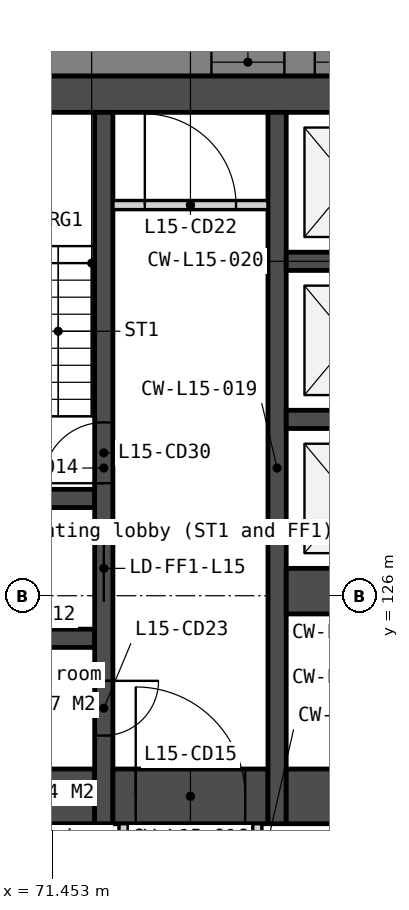
"""IFC4 building model, lengths in metres.
Left out: names, types, materials, properties, quantities, classifications, styles, units other than length and angle.
Written with IfcOpenShell. Run it as: python <this file> out.ifc"""

import sys

from ifc_helpers import new_model, si_unit, direction, frame, frame_2d, origin, place, context, subcontext, project, spatial, polyline, rectangle, outline, extrude, element, fill, save


model = new_model("IFC4")
c1 = context("Model", 3, precision=1e-05, world=origin(), true_north=direction((0.0, 1.0)))
c2 = subcontext(c1, "Body", "Model", "MODEL_VIEW")
j1 = project(units=[si_unit("LENGTHUNIT", "METRE"), si_unit("PLANEANGLEUNIT", "RADIAN")], contexts=[c1])
p1 = place(None, origin())
s1 = spatial("IfcSite", under=j1, at=p1, CompositionType="ELEMENT")
p2 = place(p1, origin())
s2 = spatial("IfcBuilding", under=s1, at=p2, CompositionType="ELEMENT")
p3 = place(p2, frame((0.0, 0.0, 66.5)))
s3 = spatial("IfcBuildingStorey", under=s2, at=p3, CompositionType="ELEMENT", Elevation=66.5)
p4 = place(p3, frame((66.0, 134.25, 0.0), z_axis=(0.0, 0.0, 1.0), x_axis=(1.0, 0.0, 0.0)))
e1 = element("IfcWall", 1, at=p4, inside=s3, PredefinedType="SOLIDWALL", context=c2, shape_type="SweptSolid", body=[
    extrude(rectangle(XDim=28.0, YDim=0.6, at=frame_2d((14.0, 0.0))), origin(), (0.0, 0.0, 1.0), 3.35),
])
for number, where, z_axis, x_axis in (
    (2, (69.6, 127.6, 0.0), (0.0, 0.0, 1.0), (1.0, 0.0, 0.0)),
    (3, (69.6, 125.3, 0.0), (0.0, 0.0, 1.0), (1.0, 0.0, 0.0)),
):
    element("IfcWall", number, at=place(p3, frame(where, z_axis=z_axis, x_axis=x_axis)), inside=s3, PredefinedType="SOLIDWALL", context=c2, shape_type="SweptSolid", body=[
        extrude(rectangle(XDim=2.55, YDim=0.3, at=frame_2d((1.275, 0.0))), origin(), (0.0, 0.0, 1.0), 3.35),
    ])
p5 = place(p3, frame((69.6, 122.7, 0.0), z_axis=(0.0, 0.0, 1.0), x_axis=(1.0, 0.0, 0.0)))
e4 = element("IfcWall", 4, at=p5, inside=s3, PredefinedType="SOLIDWALL", context=c2, shape_type="SweptSolid", body=[
    extrude(rectangle(XDim=2.55, YDim=0.9, at=frame_2d((1.275, 0.0))), origin(), (0.0, 0.0, 1.0), 3.35),
])
p6 = place(p3, frame((72.3, 133.95, 0.0), z_axis=(0.0, 0.0, 1.0), x_axis=(0.0, -1.0, 0.0)))
e5 = element("IfcWall", 5, at=p6, inside=s3, PredefinedType="SOLIDWALL", context=c2, shape_type="SweptSolid", body=[
    extrude(rectangle(XDim=11.7, YDim=0.3, at=frame_2d((5.85, 0.0))), origin(), (0.0, 0.0, 1.0), 3.35),
])
p7 = place(p6, frame((6.95, 0.0, 0.0)))
e6 = element("IfcOpeningElement", 6, at=p7, cuts=e5, PredefinedType="OPENING", context=c2, shape_type="SweptSolid", body=[
    extrude(rectangle(XDim=1.1, YDim=2.1, at=frame_2d((0.55, 1.05))), frame((0.0, 0.16, 0.0), z_axis=(0.0, -1.0, 0.0), x_axis=(1.0, 0.0, 0.0)), (0.0, 0.0, 1.0), 0.32),
])
p8 = place(p6, frame((9.35, 0.0, 0.0)))
e7 = element("IfcOpeningElement", 7, at=p8, cuts=e5, PredefinedType="OPENING", context=c2, shape_type="SweptSolid", body=[
    extrude(rectangle(XDim=0.9, YDim=2.1, at=frame_2d((0.45, 1.05))), frame((0.0, 0.16, 0.0), z_axis=(0.0, -1.0, 0.0), x_axis=(1.0, 0.0, 0.0)), (0.0, 0.0, 1.0), 0.32),
])
p9 = place(p6, frame((5.1, 0.0, 0.0)))
e8 = element("IfcOpeningElement", 8, at=p9, cuts=e5, PredefinedType="OPENING", context=c2, shape_type="SweptSolid", body=[
    extrude(rectangle(XDim=1.0, YDim=2.1, at=frame_2d((0.5, 1.05))), frame((0.0, 0.16, 0.0), z_axis=(0.0, -1.0, 0.0), x_axis=(1.0, 0.0, 0.0)), (0.0, 0.0, 1.0), 0.32),
])
p10 = place(p3, frame((72.45, 132.425, 0.0), z_axis=(0.0, 0.0, 1.0), x_axis=(1.0, 0.0, 0.0)))
e9 = element("IfcWall", 9, at=p10, inside=s3, PredefinedType="PARTITIONING", context=c2, shape_type="SweptSolid", body=[
    extrude(rectangle(XDim=2.55, YDim=0.15, at=frame_2d((1.275, 0.0))), origin(), (0.0, 0.0, 1.0), 3.35),
])
p11 = place(p10, frame((0.525, 0.0, 0.0)))
e10 = element("IfcOpeningElement", 10, at=p11, cuts=e9, PredefinedType="OPENING", context=c2, shape_type="SweptSolid", body=[
    extrude(rectangle(XDim=1.5, YDim=2.1, at=frame_2d((0.75, 1.05))), frame((0.0, 0.085, 0.0), z_axis=(0.0, -1.0, 0.0), x_axis=(1.0, 0.0, 0.0)), (0.0, 0.0, 1.0), 0.17),
])
p12 = place(p3, frame((72.45, 122.7, 0.0), z_axis=(0.0, 0.0, 1.0), x_axis=(1.0, 0.0, 0.0)))
e11 = element("IfcWall", 11, at=p12, inside=s3, PredefinedType="SOLIDWALL", context=c2, shape_type="SweptSolid", body=[
    extrude(rectangle(XDim=2.55, YDim=0.9, at=frame_2d((1.275, 0.0))), origin(), (0.0, 0.0, 1.0), 3.35),
])
p13 = place(p12, frame((0.375, 0.0, 0.0)))
e12 = element("IfcOpeningElement", 12, at=p13, cuts=e11, PredefinedType="OPENING", context=c2, shape_type="SweptSolid", body=[
    extrude(rectangle(XDim=1.8, YDim=2.1, at=frame_2d((0.9, 1.05))), frame((0.0, 0.46, 0.0), z_axis=(0.0, -1.0, 0.0), x_axis=(1.0, 0.0, 0.0)), (0.0, 0.0, 1.0), 0.92),
])
for number, where, z_axis, x_axis in (
    (13, (72.625, 122.25, 0.0), (0.0, 0.0, 1.0), (0.0, -1.0, 0.0)),
    (14, (74.825, 122.25, 0.0), (0.0, 0.0, 1.0), (0.0, -1.0, 0.0)),
):
    element("IfcWall", number, at=place(p3, frame(where, z_axis=z_axis, x_axis=x_axis)), inside=s3, PredefinedType="PARTITIONING", context=c2, shape_type="SweptSolid", body=[
        extrude(rectangle(XDim=2.1, YDim=0.15, at=frame_2d((1.05, 0.0))), origin(), (0.0, 0.0, 1.0), 3.35),
    ])
p14 = place(p3, frame((75.15, 133.95, 0.0), z_axis=(0.0, 0.0, 1.0), x_axis=(0.0, -1.0, 0.0)))
e15 = element("IfcWall", 15, at=p14, inside=s3, PredefinedType="SOLIDWALL", context=c2, shape_type="SweptSolid", body=[
    extrude(rectangle(XDim=11.7, YDim=0.3, at=frame_2d((5.85, 0.0))), origin(), (0.0, 0.0, 1.0), 3.35),
])
for number, where, z_axis, x_axis in (
    (16, (75.3, 131.5, 0.0), (0.0, 0.0, 1.0), (1.0, 0.0, 0.0)),
    (17, (75.3, 128.9, 0.0), (0.0, 0.0, 1.0), (1.0, 0.0, 0.0)),
):
    element("IfcWall", number, at=place(p3, frame(where, z_axis=z_axis, x_axis=x_axis)), inside=s3, PredefinedType="SOLIDWALL", context=c2, shape_type="SweptSolid", body=[
        extrude(rectangle(XDim=2.1, YDim=0.3, at=frame_2d((1.05, 0.0))), origin(), (0.0, 0.0, 1.0), 3.35),
    ])
p15 = place(p3, frame((75.3, 126.075, 0.0), z_axis=(0.0, 0.0, 1.0), x_axis=(1.0, 0.0, 0.0)))
e18 = element("IfcWall", 18, at=p15, inside=s3, PredefinedType="SOLIDWALL", context=c2, shape_type="SweptSolid", body=[
    extrude(rectangle(XDim=2.1, YDim=0.75, at=frame_2d((1.05, 0.0))), origin(), (0.0, 0.0, 1.0), 3.35),
])
p16 = place(p3, frame((75.3, 122.7, 0.0), z_axis=(0.0, 0.0, 1.0), x_axis=(1.0, 0.0, 0.0)))
e19 = element("IfcWall", 19, at=p16, inside=s3, PredefinedType="SOLIDWALL", context=c2, shape_type="SweptSolid", body=[
    extrude(rectangle(XDim=6.2, YDim=0.9, at=frame_2d((3.1, 0.0))), origin(), (0.0, 0.0, 1.0), 3.35),
])
p17 = place(p3, frame((102.4, 134.775, -0.15), z_axis=(0.0, 0.0, 1.0), x_axis=(-1.0, 0.0, 0.0)))
e20 = element("IfcWall", 20, at=p17, inside=s3, PredefinedType="SOLIDWALL", context=c2, shape_type="SweptSolid", body=[
    extrude(outline(polyline([(44.8, 0.0), (44.8, 3.5), (0.0, 3.5), (0.0, 0.0), (44.8, 0.0)])), frame((0.0, 0.225, 0.0), z_axis=(0.0, -1.0, 0.0), x_axis=(1.0, 0.0, 0.0)), (0.0, 0.0, 1.0), 0.45),
])
p18 = place(p17, frame((0.722, 0.0, 1.05)))
e21 = element("IfcOpeningElement", 21, at=p18, cuts=e20, PredefinedType="OPENING", context=c2, shape_type="SweptSolid", body=[
    extrude(rectangle(XDim=1.2, YDim=1.5, at=frame_2d((0.6, 0.75))), frame((0.0, 0.235, 0.0), z_axis=(0.0, -1.0, 0.0), x_axis=(1.0, 0.0, 0.0)), (0.0, 0.0, 1.0), 0.47),
])
p19 = place(p17, frame((7.51, 0.0, 1.05)))
e22 = element("IfcOpeningElement", 22, at=p19, cuts=e20, PredefinedType="OPENING", context=c2, shape_type="SweptSolid", body=[
    extrude(rectangle(XDim=1.2, YDim=1.5, at=frame_2d((0.6, 0.75))), frame((0.0, 0.235, 0.0), z_axis=(0.0, -1.0, 0.0), x_axis=(1.0, 0.0, 0.0)), (0.0, 0.0, 1.0), 0.47),
])
p20 = place(p17, frame((9.21, 0.0, 1.05)))
e23 = element("IfcOpeningElement", 23, at=p20, cuts=e20, PredefinedType="OPENING", context=c2, shape_type="SweptSolid", body=[
    extrude(rectangle(XDim=1.2, YDim=1.5, at=frame_2d((0.6, 0.75))), frame((0.0, 0.235, 0.0), z_axis=(0.0, -1.0, 0.0), x_axis=(1.0, 0.0, 0.0)), (0.0, 0.0, 1.0), 0.47),
])
p21 = place(p17, frame((16.47, 0.0, 1.05)))
e24 = element("IfcOpeningElement", 24, at=p21, cuts=e20, PredefinedType="OPENING", context=c2, shape_type="SweptSolid", body=[
    extrude(rectangle(XDim=1.2, YDim=1.5, at=frame_2d((0.6, 0.75))), frame((0.0, 0.235, 0.0), z_axis=(0.0, -1.0, 0.0), x_axis=(1.0, 0.0, 0.0)), (0.0, 0.0, 1.0), 0.47),
])
p22 = place(p17, frame((18.17, 0.0, 1.05)))
e25 = element("IfcOpeningElement", 25, at=p22, cuts=e20, PredefinedType="OPENING", context=c2, shape_type="SweptSolid", body=[
    extrude(rectangle(XDim=1.2, YDim=1.5, at=frame_2d((0.6, 0.75))), frame((0.0, 0.235, 0.0), z_axis=(0.0, -1.0, 0.0), x_axis=(1.0, 0.0, 0.0)), (0.0, 0.0, 1.0), 0.47),
])
p23 = place(p17, frame((25.43, 0.0, 1.05)))
e26 = element("IfcOpeningElement", 26, at=p23, cuts=e20, PredefinedType="OPENING", context=c2, shape_type="SweptSolid", body=[
    extrude(rectangle(XDim=1.2, YDim=1.5, at=frame_2d((0.6, 0.75))), frame((0.0, 0.235, 0.0), z_axis=(0.0, -1.0, 0.0), x_axis=(1.0, 0.0, 0.0)), (0.0, 0.0, 1.0), 0.47),
])
p24 = place(p17, frame((27.13, 0.0, 1.05)))
e27 = element("IfcOpeningElement", 27, at=p24, cuts=e20, PredefinedType="OPENING", context=c2, shape_type="SweptSolid", body=[
    extrude(rectangle(XDim=1.2, YDim=1.5, at=frame_2d((0.6, 0.75))), frame((0.0, 0.235, 0.0), z_axis=(0.0, -1.0, 0.0), x_axis=(1.0, 0.0, 0.0)), (0.0, 0.0, 1.0), 0.47),
])
p25 = place(p17, frame((34.39, 0.0, 1.05)))
e28 = element("IfcOpeningElement", 28, at=p25, cuts=e20, PredefinedType="OPENING", context=c2, shape_type="SweptSolid", body=[
    extrude(rectangle(XDim=1.2, YDim=1.5, at=frame_2d((0.6, 0.75))), frame((0.0, 0.235, 0.0), z_axis=(0.0, -1.0, 0.0), x_axis=(1.0, 0.0, 0.0)), (0.0, 0.0, 1.0), 0.47),
])
p26 = place(p17, frame((36.09, 0.0, 1.05)))
e29 = element("IfcOpeningElement", 29, at=p26, cuts=e20, PredefinedType="OPENING", context=c2, shape_type="SweptSolid", body=[
    extrude(rectangle(XDim=1.2, YDim=1.5, at=frame_2d((0.6, 0.75))), frame((0.0, 0.235, 0.0), z_axis=(0.0, -1.0, 0.0), x_axis=(1.0, 0.0, 0.0)), (0.0, 0.0, 1.0), 0.47),
])
p27 = place(p17, frame((42.878, 0.0, 1.05)))
e30 = element("IfcOpeningElement", 30, at=p27, cuts=e20, PredefinedType="OPENING", context=c2, shape_type="SweptSolid", body=[
    extrude(rectangle(XDim=1.2, YDim=1.5, at=frame_2d((0.6, 0.75))), frame((0.0, 0.235, 0.0), z_axis=(0.0, -1.0, 0.0), x_axis=(1.0, 0.0, 0.0)), (0.0, 0.0, 1.0), 0.47),
])
p28 = place(p3, frame((54.495, 129.397, -0.15), z_axis=(0.0, 0.0, 1.0), x_axis=(0.499999201451, -0.866025864826, 0.0)))
e31 = element("IfcWall", 31, at=p28, inside=s3, PredefinedType="SOLIDWALL", context=c2, shape_type="SweptSolid", body=[
    extrude(outline(polyline([(44.8, 0.0), (44.8, 3.5), (0.0, 3.5), (0.0, 0.0), (44.8, 0.0)])), frame((0.0, 0.225, 0.0), z_axis=(0.0, -1.0, 0.0), x_axis=(1.0, 0.0, 0.0)), (0.0, 0.0, 1.0), 0.45),
])
p29 = place(p28, frame((0.722, 0.0, 1.05)))
e32 = element("IfcOpeningElement", 32, at=p29, cuts=e31, PredefinedType="OPENING", context=c2, shape_type="SweptSolid", body=[
    extrude(rectangle(XDim=1.2, YDim=1.5, at=frame_2d((0.6, 0.75))), frame((0.0, 0.235, 0.0), z_axis=(0.0, -1.0, 0.0), x_axis=(1.0, 0.0, 0.0)), (0.0, 0.0, 1.0), 0.47),
])
p30 = place(p28, frame((7.51, 0.0, 1.05)))
e33 = element("IfcOpeningElement", 33, at=p30, cuts=e31, PredefinedType="OPENING", context=c2, shape_type="SweptSolid", body=[
    extrude(rectangle(XDim=1.2, YDim=1.5, at=frame_2d((0.6, 0.75))), frame((0.0, 0.235, 0.0), z_axis=(0.0, -1.0, 0.0), x_axis=(1.0, 0.0, 0.0)), (0.0, 0.0, 1.0), 0.47),
])
p31 = place(p28, frame((9.21, 0.0, 1.05)))
e34 = element("IfcOpeningElement", 34, at=p31, cuts=e31, PredefinedType="OPENING", context=c2, shape_type="SweptSolid", body=[
    extrude(rectangle(XDim=1.2, YDim=1.5, at=frame_2d((0.6, 0.75))), frame((0.0, 0.235, 0.0), z_axis=(0.0, -1.0, 0.0), x_axis=(1.0, 0.0, 0.0)), (0.0, 0.0, 1.0), 0.47),
])
p32 = place(p28, frame((16.47, 0.0, 1.05)))
e35 = element("IfcOpeningElement", 35, at=p32, cuts=e31, PredefinedType="OPENING", context=c2, shape_type="SweptSolid", body=[
    extrude(rectangle(XDim=1.2, YDim=1.5, at=frame_2d((0.6, 0.75))), frame((0.0, 0.235, 0.0), z_axis=(0.0, -1.0, 0.0), x_axis=(1.0, 0.0, 0.0)), (0.0, 0.0, 1.0), 0.47),
])
p33 = place(p28, frame((18.17, 0.0, 1.05)))
e36 = element("IfcOpeningElement", 36, at=p33, cuts=e31, PredefinedType="OPENING", context=c2, shape_type="SweptSolid", body=[
    extrude(rectangle(XDim=1.2, YDim=1.5, at=frame_2d((0.6, 0.75))), frame((0.0, 0.235, 0.0), z_axis=(0.0, -1.0, 0.0), x_axis=(1.0, 0.0, 0.0)), (0.0, 0.0, 1.0), 0.47),
])
p34 = place(p28, frame((25.43, 0.0, 1.05)))
e37 = element("IfcOpeningElement", 37, at=p34, cuts=e31, PredefinedType="OPENING", context=c2, shape_type="SweptSolid", body=[
    extrude(rectangle(XDim=1.2, YDim=1.5, at=frame_2d((0.6, 0.75))), frame((0.0, 0.235, 0.0), z_axis=(0.0, -1.0, 0.0), x_axis=(1.0, 0.0, 0.0)), (0.0, 0.0, 1.0), 0.47),
])
p35 = place(p28, frame((27.13, 0.0, 1.05)))
e38 = element("IfcOpeningElement", 38, at=p35, cuts=e31, PredefinedType="OPENING", context=c2, shape_type="SweptSolid", body=[
    extrude(rectangle(XDim=1.2, YDim=1.5, at=frame_2d((0.6, 0.75))), frame((0.0, 0.235, 0.0), z_axis=(0.0, -1.0, 0.0), x_axis=(1.0, 0.0, 0.0)), (0.0, 0.0, 1.0), 0.47),
])
p36 = place(p28, frame((34.39, 0.0, 1.05)))
e39 = element("IfcOpeningElement", 39, at=p36, cuts=e31, PredefinedType="OPENING", context=c2, shape_type="SweptSolid", body=[
    extrude(rectangle(XDim=1.2, YDim=1.5, at=frame_2d((0.6, 0.75))), frame((0.0, 0.235, 0.0), z_axis=(0.0, -1.0, 0.0), x_axis=(1.0, 0.0, 0.0)), (0.0, 0.0, 1.0), 0.47),
])
p37 = place(p28, frame((36.09, 0.0, 1.05)))
e40 = element("IfcOpeningElement", 40, at=p37, cuts=e31, PredefinedType="OPENING", context=c2, shape_type="SweptSolid", body=[
    extrude(rectangle(XDim=1.2, YDim=1.5, at=frame_2d((0.6, 0.75))), frame((0.0, 0.235, 0.0), z_axis=(0.0, -1.0, 0.0), x_axis=(1.0, 0.0, 0.0)), (0.0, 0.0, 1.0), 0.47),
])
p38 = place(p28, frame((42.878, 0.0, 1.05)))
e41 = element("IfcOpeningElement", 41, at=p38, cuts=e31, PredefinedType="OPENING", context=c2, shape_type="SweptSolid", body=[
    extrude(rectangle(XDim=1.2, YDim=1.5, at=frame_2d((0.6, 0.75))), frame((0.0, 0.235, 0.0), z_axis=(0.0, -1.0, 0.0), x_axis=(1.0, 0.0, 0.0)), (0.0, 0.0, 1.0), 0.47),
])
p39 = place(p7, origin())
e42 = element("IfcDoor", 42, at=p39, inside=s3, OperationType="SLIDING_TO_LEFT", PredefinedType="DOOR", context=c2, shape_type="SweptSolid", body=[
    extrude(rectangle(XDim=1.1, YDim=2.1, at=frame_2d((0.55, 1.05))), frame((0.0, 0.025, 0.0), z_axis=(0.0, -1.0, 0.0), x_axis=(1.0, 0.0, 0.0)), (0.0, 0.0, 1.0), 0.05),
])
fill(e6, e42)
p40 = place(p13, origin())
e43 = element("IfcDoor", 43, at=p40, inside=s3, OperationType="DOUBLE_DOOR_DOUBLE_SWING", PredefinedType="DOOR", context=c2, shape_type="SweptSolid", body=[
    extrude(rectangle(XDim=1.8, YDim=2.1, at=frame_2d((0.9, 1.05))), frame((0.0, 0.025, 0.0), z_axis=(0.0, -1.0, 0.0), x_axis=(1.0, 0.0, 0.0)), (0.0, 0.0, 1.0), 0.05),
])
fill(e12, e43)
p41 = place(p11, origin())
e44 = element("IfcDoor", 44, at=p41, inside=s3, OperationType="DOUBLE_DOOR_DOUBLE_SWING", PredefinedType="DOOR", context=c2, shape_type="SweptSolid", body=[
    extrude(rectangle(XDim=1.5, YDim=2.1, at=frame_2d((0.75, 1.05))), frame((0.0, 0.025, 0.0), z_axis=(0.0, -1.0, 0.0), x_axis=(1.0, 0.0, 0.0)), (0.0, 0.0, 1.0), 0.05),
])
fill(e10, e44)
p42 = place(p8, origin())
e45 = element("IfcDoor", 45, at=p42, inside=s3, OperationType="SINGLE_SWING_LEFT", PredefinedType="DOOR", context=c2, shape_type="SweptSolid", body=[
    extrude(rectangle(XDim=0.9, YDim=2.1, at=frame_2d((0.45, 1.05))), frame((0.0, 0.025, 0.0), z_axis=(0.0, -1.0, 0.0), x_axis=(1.0, 0.0, 0.0)), (0.0, 0.0, 1.0), 0.05),
])
fill(e7, e45)
p43 = place(p9, origin())
e46 = element("IfcDoor", 46, at=p43, inside=s3, OperationType="SINGLE_SWING_RIGHT", PredefinedType="DOOR", context=c2, shape_type="SweptSolid", body=[
    extrude(rectangle(XDim=1.0, YDim=2.1, at=frame_2d((0.5, 1.05))), frame((0.0, 0.025, 0.0), z_axis=(0.0, -1.0, 0.0), x_axis=(1.0, 0.0, 0.0)), (0.0, 0.0, 1.0), 0.05),
])
fill(e8, e46)
p44 = place(p23, origin())
e47 = element("IfcWindow", 47, at=p44, inside=s3, PartitioningType="SINGLE_PANEL", PredefinedType="WINDOW", context=c2, shape_type="SweptSolid", body=[
    extrude(rectangle(XDim=1.2, YDim=1.5, at=frame_2d((0.6, 0.75))), frame((0.0, 0.03, 0.0), z_axis=(0.0, -1.0, 0.0), x_axis=(1.0, 0.0, 0.0)), (0.0, 0.0, 1.0), 0.06),
])
fill(e26, e47)
p45 = place(p24, origin())
e48 = element("IfcWindow", 48, at=p45, inside=s3, PartitioningType="SINGLE_PANEL", PredefinedType="WINDOW", context=c2, shape_type="SweptSolid", body=[
    extrude(rectangle(XDim=1.2, YDim=1.5, at=frame_2d((0.6, 0.75))), frame((0.0, 0.03, 0.0), z_axis=(0.0, -1.0, 0.0), x_axis=(1.0, 0.0, 0.0)), (0.0, 0.0, 1.0), 0.06),
])
fill(e27, e48)
save(model, sys.argv[1])
